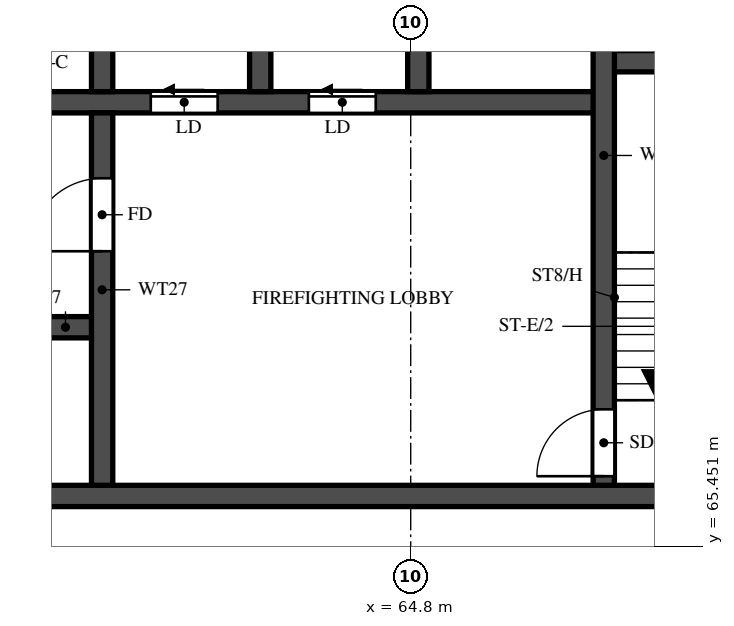
"""IFC4 building model, lengths in metres.
Left out: names, types, materials, properties, quantities, classifications, styles, units other than length and angle.
Written with IfcOpenShell. Run it as: python <this file> out.ifc"""

import sys

from ifc_helpers import new_model, si_unit, direction, frame, frame_2d, origin, place, context, subcontext, project, spatial, rectangle, extrude, element, fill, save


model = new_model("IFC4")
c1 = context("Model", 3, precision=1e-05, world=origin(), true_north=direction((0.0, 1.0)))
c2 = subcontext(c1, "Body", "Model", "MODEL_VIEW")
j1 = project(units=[si_unit("LENGTHUNIT", "METRE"), si_unit("PLANEANGLEUNIT", "RADIAN")], contexts=[c1])
p1 = place(None, origin())
s1 = spatial("IfcSite", under=j1, at=p1, CompositionType="ELEMENT")
p2 = place(p1, origin())
s2 = spatial("IfcBuilding", under=s1, at=p2, CompositionType="ELEMENT")
p3 = place(p2, frame((0.0, 0.0, 185.0)))
s3 = spatial("IfcBuildingStorey", under=s2, at=p3, CompositionType="ELEMENT", Elevation=185.0)
p4 = place(p3, frame((29.7, 66.275, 0.0), z_axis=(0.0, 0.0, 1.0), x_axis=(1.0, 0.0, 0.0)))
e1 = element("IfcWall", 1, at=p4, inside=s3, PredefinedType="SHEAR", context=c2, shape_type="SweptSolid", body=[
    extrude(rectangle(XDim=41.4, YDim=0.35, at=frame_2d((20.7, 0.0))), origin(), (0.0, 0.0, 1.0), 3.2),
])
p5 = place(p4, frame((0.925, 0.0, 0.0)))
e2 = element("IfcOpeningElement", 2, at=p5, cuts=e1, PredefinedType="OPENING", context=c2, shape_type="SweptSolid", body=[
    extrude(rectangle(XDim=1.1, YDim=2.1, at=frame_2d((0.55, 1.05))), frame((0.0, 0.185, 0.0), z_axis=(0.0, -1.0, 0.0), x_axis=(1.0, 0.0, 0.0)), (0.0, 0.0, 1.0), 0.37),
])
p6 = place(p4, frame((3.712, 0.0, 0.0)))
e3 = element("IfcOpeningElement", 3, at=p6, cuts=e1, PredefinedType="OPENING", context=c2, shape_type="SweptSolid", body=[
    extrude(rectangle(XDim=1.8, YDim=2.1, at=frame_2d((0.9, 1.05))), frame((0.0, 0.185, 0.0), z_axis=(0.0, -1.0, 0.0), x_axis=(1.0, 0.0, 0.0)), (0.0, 0.0, 1.0), 0.37),
])
p7 = place(p3, frame((35.625, 69.05, 0.0), z_axis=(0.0, 0.0, 1.0), x_axis=(1.0, 0.0, 0.0)))
e4 = element("IfcWall", 4, at=p7, inside=s3, PredefinedType="SHEAR", context=c2, shape_type="SweptSolid", body=[
    extrude(rectangle(XDim=24.1, YDim=0.35, at=frame_2d((12.05, 0.0))), origin(), (0.0, 0.0, 1.0), 3.2),
])
p8 = place(p7, frame((1.0, 0.0, 0.0)))
e5 = element("IfcOpeningElement", 5, at=p8, cuts=e4, PredefinedType="OPENING", context=c2, shape_type="SweptSolid", body=[
    extrude(rectangle(XDim=1.1, YDim=2.1, at=frame_2d((0.55, 1.05))), frame((0.0, 0.185, 0.0), z_axis=(0.0, -1.0, 0.0), x_axis=(1.0, 0.0, 0.0)), (0.0, 0.0, 1.0), 0.37),
])
p9 = place(p7, frame((3.75, 0.0, 0.0)))
e6 = element("IfcOpeningElement", 6, at=p9, cuts=e4, PredefinedType="OPENING", context=c2, shape_type="SweptSolid", body=[
    extrude(rectangle(XDim=1.1, YDim=2.1, at=frame_2d((0.55, 1.05))), frame((0.0, 0.185, 0.0), z_axis=(0.0, -1.0, 0.0), x_axis=(1.0, 0.0, 0.0)), (0.0, 0.0, 1.0), 0.37),
])
p10 = place(p7, frame((6.5, 0.0, 0.0)))
e7 = element("IfcOpeningElement", 7, at=p10, cuts=e4, PredefinedType="OPENING", context=c2, shape_type="SweptSolid", body=[
    extrude(rectangle(XDim=1.1, YDim=2.1, at=frame_2d((0.55, 1.05))), frame((0.0, 0.185, 0.0), z_axis=(0.0, -1.0, 0.0), x_axis=(1.0, 0.0, 0.0)), (0.0, 0.0, 1.0), 0.37),
])
p11 = place(p7, frame((9.25, 0.0, 0.0)))
e8 = element("IfcOpeningElement", 8, at=p11, cuts=e4, PredefinedType="OPENING", context=c2, shape_type="SweptSolid", body=[
    extrude(rectangle(XDim=1.1, YDim=2.1, at=frame_2d((0.55, 1.05))), frame((0.0, 0.185, 0.0), z_axis=(0.0, -1.0, 0.0), x_axis=(1.0, 0.0, 0.0)), (0.0, 0.0, 1.0), 0.37),
])
p12 = place(p7, frame((12.0, 0.0, 0.0)))
e9 = element("IfcOpeningElement", 9, at=p12, cuts=e4, PredefinedType="OPENING", context=c2, shape_type="SweptSolid", body=[
    extrude(rectangle(XDim=1.1, YDim=2.1, at=frame_2d((0.55, 1.05))), frame((0.0, 0.185, 0.0), z_axis=(0.0, -1.0, 0.0), x_axis=(1.0, 0.0, 0.0)), (0.0, 0.0, 1.0), 0.37),
])
p13 = place(p7, frame((14.75, 0.0, 0.0)))
e10 = element("IfcOpeningElement", 10, at=p13, cuts=e4, PredefinedType="OPENING", context=c2, shape_type="SweptSolid", body=[
    extrude(rectangle(XDim=1.1, YDim=2.1, at=frame_2d((0.55, 1.05))), frame((0.0, 0.185, 0.0), z_axis=(0.0, -1.0, 0.0), x_axis=(1.0, 0.0, 0.0)), (0.0, 0.0, 1.0), 0.37),
])
p14 = place(p7, frame((17.625, 0.0, 0.0)))
e11 = element("IfcOpeningElement", 11, at=p14, cuts=e4, PredefinedType="OPENING", context=c2, shape_type="SweptSolid", body=[
    extrude(rectangle(XDim=1.1, YDim=2.1, at=frame_2d((0.55, 1.05))), frame((0.0, 0.185, 0.0), z_axis=(0.0, -1.0, 0.0), x_axis=(1.0, 0.0, 0.0)), (0.0, 0.0, 1.0), 0.37),
])
p15 = place(p7, frame((20.625, 0.0, 0.0)))
e12 = element("IfcOpeningElement", 12, at=p15, cuts=e4, PredefinedType="OPENING", context=c2, shape_type="SweptSolid", body=[
    extrude(rectangle(XDim=1.1, YDim=2.1, at=frame_2d((0.55, 1.05))), frame((0.0, 0.185, 0.0), z_axis=(0.0, -1.0, 0.0), x_axis=(1.0, 0.0, 0.0)), (0.0, 0.0, 1.0), 0.37),
])
p16 = place(p3, frame((32.825, 72.75, 0.0), z_axis=(0.0, 0.0, 1.0), x_axis=(1.0, 0.0, 0.0)))
e13 = element("IfcWall", 13, at=p16, inside=s3, PredefinedType="SHEAR", context=c2, shape_type="SweptSolid", body=[
    extrude(rectangle(XDim=35.15, YDim=0.35, at=frame_2d((17.575, 0.0))), origin(), (0.0, 0.0, 1.0), 3.2),
])
p17 = place(p16, frame((19.8, 0.0, 0.0)))
e14 = element("IfcOpeningElement", 14, at=p17, cuts=e13, PredefinedType="OPENING", context=c2, shape_type="SweptSolid", body=[
    extrude(rectangle(XDim=1.1, YDim=2.1, at=frame_2d((0.55, 1.05))), frame((0.0, 0.185, 0.0), z_axis=(0.0, -1.0, 0.0), x_axis=(1.0, 0.0, 0.0)), (0.0, 0.0, 1.0), 0.37),
])
p18 = place(p16, frame((27.7, 0.0, 0.0)))
e15 = element("IfcOpeningElement", 15, at=p18, cuts=e13, PredefinedType="OPENING", context=c2, shape_type="SweptSolid", body=[
    extrude(rectangle(XDim=1.1, YDim=2.1, at=frame_2d((0.55, 1.05))), frame((0.0, 0.185, 0.0), z_axis=(0.0, -1.0, 0.0), x_axis=(1.0, 0.0, 0.0)), (0.0, 0.0, 1.0), 0.37),
])
p19 = place(p16, frame((30.3, 0.0, 0.0)))
e16 = element("IfcOpeningElement", 16, at=p19, cuts=e13, PredefinedType="OPENING", context=c2, shape_type="SweptSolid", body=[
    extrude(rectangle(XDim=1.1, YDim=2.1, at=frame_2d((0.55, 1.05))), frame((0.0, 0.185, 0.0), z_axis=(0.0, -1.0, 0.0), x_axis=(1.0, 0.0, 0.0)), (0.0, 0.0, 1.0), 0.37),
])
p20 = place(p16, frame((3.8, 0.0, 0.0)))
e17 = element("IfcOpeningElement", 17, at=p20, cuts=e13, PredefinedType="OPENING", context=c2, shape_type="SweptSolid", body=[
    extrude(rectangle(XDim=1.1, YDim=2.1, at=frame_2d((0.55, 1.05))), frame((0.0, 0.185, 0.0), z_axis=(0.0, -1.0, 0.0), x_axis=(1.0, 0.0, 0.0)), (0.0, 0.0, 1.0), 0.37),
])
p21 = place(p16, frame((6.55, 0.0, 0.0)))
e18 = element("IfcOpeningElement", 18, at=p21, cuts=e13, PredefinedType="OPENING", context=c2, shape_type="SweptSolid", body=[
    extrude(rectangle(XDim=1.1, YDim=2.1, at=frame_2d((0.55, 1.05))), frame((0.0, 0.185, 0.0), z_axis=(0.0, -1.0, 0.0), x_axis=(1.0, 0.0, 0.0)), (0.0, 0.0, 1.0), 0.37),
])
p22 = place(p16, frame((9.3, 0.0, 0.0)))
e19 = element("IfcOpeningElement", 19, at=p22, cuts=e13, PredefinedType="OPENING", context=c2, shape_type="SweptSolid", body=[
    extrude(rectangle(XDim=1.1, YDim=2.1, at=frame_2d((0.55, 1.05))), frame((0.0, 0.185, 0.0), z_axis=(0.0, -1.0, 0.0), x_axis=(1.0, 0.0, 0.0)), (0.0, 0.0, 1.0), 0.37),
])
p23 = place(p16, frame((12.05, 0.0, 0.0)))
e20 = element("IfcOpeningElement", 20, at=p23, cuts=e13, PredefinedType="OPENING", context=c2, shape_type="SweptSolid", body=[
    extrude(rectangle(XDim=1.1, YDim=2.1, at=frame_2d((0.55, 1.05))), frame((0.0, 0.185, 0.0), z_axis=(0.0, -1.0, 0.0), x_axis=(1.0, 0.0, 0.0)), (0.0, 0.0, 1.0), 0.37),
])
p24 = place(p16, frame((14.8, 0.0, 0.0)))
e21 = element("IfcOpeningElement", 21, at=p24, cuts=e13, PredefinedType="OPENING", context=c2, shape_type="SweptSolid", body=[
    extrude(rectangle(XDim=1.1, YDim=2.1, at=frame_2d((0.55, 1.05))), frame((0.0, 0.185, 0.0), z_axis=(0.0, -1.0, 0.0), x_axis=(1.0, 0.0, 0.0)), (0.0, 0.0, 1.0), 0.37),
])
p25 = place(p16, frame((17.55, 0.0, 0.0)))
e22 = element("IfcOpeningElement", 22, at=p25, cuts=e13, PredefinedType="OPENING", context=c2, shape_type="SweptSolid", body=[
    extrude(rectangle(XDim=1.1, YDim=2.1, at=frame_2d((0.55, 1.05))), frame((0.0, 0.185, 0.0), z_axis=(0.0, -1.0, 0.0), x_axis=(1.0, 0.0, 0.0)), (0.0, 0.0, 1.0), 0.37),
])
p26 = place(p16, frame((0.938, 0.0, 0.0)))
e23 = element("IfcOpeningElement", 23, at=p26, cuts=e13, PredefinedType="OPENING", context=c2, shape_type="SweptSolid", body=[
    extrude(rectangle(XDim=1.1, YDim=2.1, at=frame_2d((0.55, 1.05))), frame((0.0, 0.185, 0.0), z_axis=(0.0, -1.0, 0.0), x_axis=(1.0, 0.0, 0.0)), (0.0, 0.0, 1.0), 0.37),
])
p27 = place(p3, frame((67.975, 73.425, 0.0), z_axis=(0.0, 0.0, 1.0), x_axis=(1.0, 0.0, 0.0)))
e24 = element("IfcWall", 24, at=p27, inside=s3, PredefinedType="SHEAR", context=c2, shape_type="SweptSolid", body=[
    extrude(rectangle(XDim=3.125, YDim=0.35, at=frame_2d((1.562, 0.0))), origin(), (0.0, 0.0, 1.0), 3.2),
])
p28 = place(p3, frame((67.975, 66.45, 0.0), z_axis=(0.0, 0.0, 1.0), x_axis=(0.0, 1.0, 0.0)))
e25 = element("IfcWall", 25, at=p28, inside=s3, PredefinedType="SHEAR", context=c2, shape_type="SweptSolid", body=[
    extrude(rectangle(XDim=10.85, YDim=0.35, at=frame_2d((5.425, 0.0))), origin(), (0.0, 0.0, 1.0), 3.2),
])
p29 = place(p28, frame((0.15, 0.0, 0.0)))
e26 = element("IfcOpeningElement", 26, at=p29, cuts=e25, PredefinedType="OPENING", context=c2, shape_type="SweptSolid", body=[
    extrude(rectangle(XDim=1.1, YDim=2.1, at=frame_2d((0.55, 1.05))), frame((0.0, 0.185, 0.0), z_axis=(0.0, -1.0, 0.0), x_axis=(1.0, 0.0, 0.0)), (0.0, 0.0, 1.0), 0.37),
])
p30 = place(p3, frame((59.725, 66.45, 0.0), z_axis=(0.0, 0.0, 1.0), x_axis=(0.0, 1.0, 0.0)))
e27 = element("IfcWall", 27, at=p30, inside=s3, PredefinedType="SHEAR", context=c2, shape_type="SweptSolid", body=[
    extrude(rectangle(XDim=6.125, YDim=0.35, at=frame_2d((3.062, 0.0))), origin(), (0.0, 0.0, 1.0), 3.2),
])
p31 = place(p30, frame((3.85, 0.0, 0.0)))
e28 = element("IfcOpeningElement", 28, at=p31, cuts=e27, PredefinedType="OPENING", context=c2, shape_type="SweptSolid", body=[
    extrude(rectangle(XDim=1.2, YDim=2.1, at=frame_2d((0.6, 1.05))), frame((0.0, 0.185, 0.0), z_axis=(0.0, -1.0, 0.0), x_axis=(1.0, 0.0, 0.0)), (0.0, 0.0, 1.0), 0.37),
])
for number, where, z_axis, x_axis in (
    (29, (59.725, 72.925, 0.0), (0.0, 0.0, 1.0), (0.0, 1.0, 0.0)),
    (30, (62.325, 72.925, 0.0), (0.0, 0.0, 1.0), (0.0, 1.0, 0.0)),
    (31, (64.925, 72.925, 0.0), (0.0, 0.0, 1.0), (0.0, 1.0, 0.0)),
):
    element("IfcWall", number, at=place(p3, frame(where, z_axis=z_axis, x_axis=x_axis)), inside=s3, PredefinedType="SHEAR", context=c2, shape_type="SweptSolid", body=[
        extrude(rectangle(XDim=2.95, YDim=0.35, at=frame_2d((1.475, 0.0))), origin(), (0.0, 0.0, 1.0), 3.2),
    ])
p32 = place(p29, origin())
e32 = element("IfcDoor", 32, at=p32, inside=s3, OperationType="SINGLE_SWING_LEFT", PredefinedType="DOOR", context=c2, shape_type="SweptSolid", body=[
    extrude(rectangle(XDim=1.1, YDim=2.1, at=frame_2d((0.55, 1.05))), frame((0.0, 0.025, 0.0), z_axis=(0.0, -1.0, 0.0), x_axis=(1.0, 0.0, 0.0)), (0.0, 0.0, 1.0), 0.05),
])
fill(e26, e32)
p33 = place(p31, origin())
e33 = element("IfcDoor", 33, at=p33, inside=s3, OperationType="SINGLE_SWING_LEFT", PredefinedType="DOOR", context=c2, shape_type="SweptSolid", body=[
    extrude(rectangle(XDim=1.2, YDim=2.1, at=frame_2d((0.6, 1.05))), frame((0.0, 0.025, 0.0), z_axis=(0.0, -1.0, 0.0), x_axis=(1.0, 0.0, 0.0)), (0.0, 0.0, 1.0), 0.05),
])
fill(e28, e33)
p34 = place(p18, origin())
e34 = element("IfcDoor", 34, at=p34, inside=s3, OperationType="SLIDING_TO_LEFT", PredefinedType="DOOR", context=c2, shape_type="SweptSolid", body=[
    extrude(rectangle(XDim=1.1, YDim=2.1, at=frame_2d((0.55, 1.05))), frame((0.0, 0.025, 0.0), z_axis=(0.0, -1.0, 0.0), x_axis=(1.0, 0.0, 0.0)), (0.0, 0.0, 1.0), 0.05),
])
fill(e15, e34)
p35 = place(p19, origin())
e35 = element("IfcDoor", 35, at=p35, inside=s3, OperationType="SLIDING_TO_LEFT", PredefinedType="DOOR", context=c2, shape_type="SweptSolid", body=[
    extrude(rectangle(XDim=1.1, YDim=2.1, at=frame_2d((0.55, 1.05))), frame((0.0, 0.025, 0.0), z_axis=(0.0, -1.0, 0.0), x_axis=(1.0, 0.0, 0.0)), (0.0, 0.0, 1.0), 0.05),
])
fill(e16, e35)
save(model, sys.argv[1])
